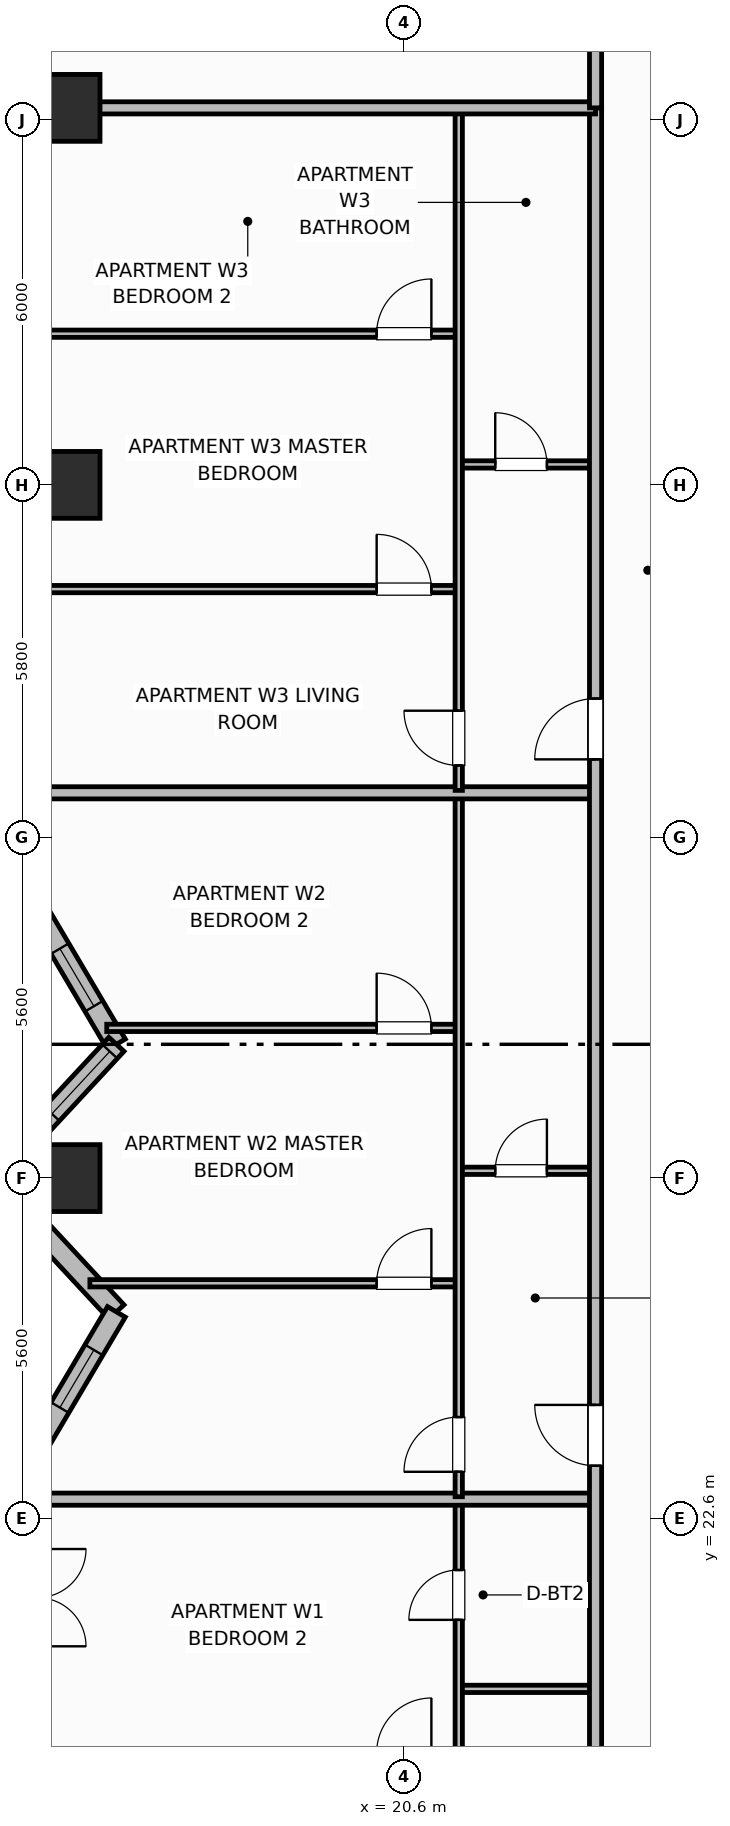
"""IFC4 building model, lengths in metres.
Left out: names, types, materials, properties, quantities, classifications, styles, units other than length and angle.
Written with IfcOpenShell. Run it as: python <this file> out.ifc"""

import sys

from ifc_helpers import new_model, si_unit, direction, frame, frame_2d, origin, origin_2d, place, context, subcontext, project, spatial, rectangle, extrude, element, fill, save


model = new_model("IFC4")
c1 = context("Model", 3, precision=1e-05, world=origin(), true_north=direction((0.0, 1.0)))
c2 = subcontext(c1, "Body", "Model", "MODEL_VIEW")
j1 = project(units=[si_unit("LENGTHUNIT", "METRE"), si_unit("PLANEANGLEUNIT", "RADIAN")], contexts=[c1])
p1 = place(None, origin())
s1 = spatial("IfcSite", under=j1, at=p1, CompositionType="ELEMENT")
p2 = place(p1, origin())
s2 = spatial("IfcBuilding", under=s1, at=p2, CompositionType="ELEMENT")
p3 = place(p2, frame((0.0, 0.0, 114.2)))
s3 = spatial("IfcBuildingStorey", under=s2, at=p3, CompositionType="ELEMENT", Elevation=114.2)
for number, where, z_axis, x_axis in (
    (1, (15.05, 28.2, 0.0), (0.0, 0.0, 1.0), (1.0, 0.0, 0.0)),
    (2, (15.05, 39.6, 0.0), (0.0, 0.0, 1.0), (1.0, 0.0, 0.0)),
    (3, (15.05, 45.8, 0.0), (0.0, 0.0, 1.0), (1.0, 0.0, 0.0)),
):
    element("IfcColumn", number, at=place(p3, frame(where, z_axis=z_axis, x_axis=x_axis)), inside=s3, PredefinedType="COLUMN", context=c2, shape_type="SweptSolid", body=[
        extrude(rectangle(XDim=1.1, YDim=1.1, at=origin_2d()), origin(), (0.0, 0.0, 1.0), 3.7),
    ])
p4 = place(p3, frame((14.57, 32.6, 0.0), z_axis=(0.0, 0.0, 1.0), x_axis=(0.508710000703, -0.860937939218, 0.0)))
e4 = element("IfcWall", 4, at=p4, inside=s3, PredefinedType="SOLIDWALL", context=c2, shape_type="SweptSolid", body=[
    extrude(rectangle(XDim=2.556, YDim=0.34, at=frame_2d((1.278, 0.0))), origin(), (0.0, 0.0, 1.0), 2.7),
])
p5 = place(p4, frame((0.728, 0.0, 0.89)))
e5 = element("IfcOpeningElement", 5, at=p5, cuts=e4, PredefinedType="OPENING", context=c2, shape_type="SweptSolid", body=[
    extrude(rectangle(XDim=1.1, YDim=1.65, at=frame_2d((0.55, 0.825))), frame((0.0, 0.18, 0.0), z_axis=(0.0, -1.0, 0.0), x_axis=(1.0, 0.0, 0.0)), (0.0, 0.0, 1.0), 0.36),
])
p6 = place(p3, frame((15.87, 30.4, 0.0), z_axis=(0.0, 0.0, 1.0), x_axis=(-0.68049031116, -0.732757078722, 0.0)))
e6 = element("IfcWall", 6, at=p6, inside=s3, PredefinedType="SOLIDWALL", context=c2, shape_type="SweptSolid", body=[
    extrude(rectangle(XDim=1.91, YDim=0.34, at=frame_2d((0.955, 0.0))), origin(), (0.0, 0.0, 1.0), 2.7),
])
p7 = place(p6, frame((0.16, 0.0, 0.69)))
e7 = element("IfcOpeningElement", 7, at=p7, cuts=e6, PredefinedType="OPENING", context=c2, shape_type="SweptSolid", body=[
    extrude(rectangle(XDim=1.4, YDim=1.85, at=frame_2d((0.7, 0.925))), frame((0.0, 0.18, 0.0), z_axis=(0.0, -1.0, 0.0), x_axis=(1.0, 0.0, 0.0)), (0.0, 0.0, 1.0), 0.36),
])
p8 = place(p3, frame((14.57, 27.4, 0.0), z_axis=(0.0, 0.0, 1.0), x_axis=(0.68049031116, -0.732757078722, 0.0)))
e8 = element("IfcWall", 8, at=p8, inside=s3, PredefinedType="SOLIDWALL", context=c2, shape_type="SweptSolid", body=[
    extrude(rectangle(XDim=1.91, YDim=0.34, at=frame_2d((0.955, 0.0))), origin(), (0.0, 0.0, 1.0), 2.7),
])
p9 = place(p3, frame((15.87, 26.0, 0.0), z_axis=(0.0, 0.0, 1.0), x_axis=(-0.508751843651, -0.860913213734, 0.0)))
e9 = element("IfcWall", 9, at=p9, inside=s3, PredefinedType="SOLIDWALL", context=c2, shape_type="SweptSolid", body=[
    extrude(rectangle(XDim=2.555, YDim=0.34, at=frame_2d((1.278, 0.0))), origin(), (0.0, 0.0, 1.0), 2.7),
])
p10 = place(p9, frame((0.728, 0.0, 0.89)))
e10 = element("IfcOpeningElement", 10, at=p10, cuts=e9, PredefinedType="OPENING", context=c2, shape_type="SweptSolid", body=[
    extrude(rectangle(XDim=1.1, YDim=1.65, at=frame_2d((0.55, 0.825))), frame((0.0, 0.18, 0.0), z_axis=(0.0, -1.0, 0.0), x_axis=(1.0, 0.0, 0.0)), (0.0, 0.0, 1.0), 0.36),
])
p11 = place(p3, frame((21.5, 19.8, 0.0), z_axis=(0.0, 0.0, 1.0), x_axis=(1.0, 0.0, 0.0)))
e11 = element("IfcWall", 11, at=p11, inside=s3, PredefinedType="PARTITIONING", context=c2, shape_type="SweptSolid", body=[
    extrude(rectangle(XDim=2.25, YDim=0.12, at=frame_2d((1.125, 0.0))), origin(), (0.0, 0.0, 1.0), 2.53),
])
p12 = place(p3, frame((21.5, 10.64, 0.0), z_axis=(0.0, 0.0, 1.0), x_axis=(0.0, 1.0, 0.0)))
e12 = element("IfcWall", 12, at=p12, inside=s3, PredefinedType="PARTITIONING", context=c2, shape_type="SweptSolid", body=[
    extrude(rectangle(XDim=12.24, YDim=0.12, at=frame_2d((6.12, 0.0))), origin(), (0.0, 0.0, 1.0), 2.53),
])
p13 = place(p12, frame((0.41, 0.0, 0.0)))
e13 = element("IfcOpeningElement", 13, at=p13, cuts=e12, PredefinedType="OPENING", context=c2, shape_type="SweptSolid", body=[
    extrude(rectangle(XDim=0.9, YDim=2.1, at=frame_2d((0.45, 1.05))), frame((0.0, 0.07, 0.0), z_axis=(0.0, -1.0, 0.0), x_axis=(1.0, 0.0, 0.0)), (0.0, 0.0, 1.0), 0.14),
])
p14 = place(p12, frame((10.295, 0.0, 0.0)))
e14 = element("IfcOpeningElement", 14, at=p14, cuts=e12, PredefinedType="OPENING", context=c2, shape_type="SweptSolid", body=[
    extrude(rectangle(XDim=0.82, YDim=2.08, at=frame_2d((0.41, 1.04))), frame((0.0, 0.07, 0.0), z_axis=(0.0, -1.0, 0.0), x_axis=(1.0, 0.0, 0.0)), (0.0, 0.0, 1.0), 0.14),
])
p15 = place(p3, frame((14.57, 22.92, 0.0), z_axis=(0.0, 0.0, 1.0), x_axis=(1.0, 0.0, 0.0)))
e15 = element("IfcWall", 15, at=p15, inside=s3, PredefinedType="PARTITIONING", context=c2, shape_type="SweptSolid", body=[
    extrude(rectangle(XDim=9.18, YDim=0.2, at=frame_2d((4.59, 0.0))), origin(), (0.0, 0.0, 1.0), 2.53),
])
p16 = place(p3, frame((21.5, 28.32, 0.0), z_axis=(0.0, 0.0, 1.0), x_axis=(1.0, 0.0, 0.0)))
e16 = element("IfcWall", 16, at=p16, inside=s3, PredefinedType="PARTITIONING", context=c2, shape_type="SweptSolid", body=[
    extrude(rectangle(XDim=2.25, YDim=0.12, at=frame_2d((1.125, 0.0))), origin(), (0.0, 0.0, 1.0), 2.53),
])
p17 = place(p16, frame((0.6, 0.0, 0.0)))
e17 = element("IfcOpeningElement", 17, at=p17, cuts=e16, PredefinedType="OPENING", context=c2, shape_type="SweptSolid", body=[
    extrude(rectangle(XDim=0.85, YDim=2.1, at=frame_2d((0.425, 1.05))), frame((0.0, 0.07, 0.0), z_axis=(0.0, -1.0, 0.0), x_axis=(1.0, 0.0, 0.0)), (0.0, 0.0, 1.0), 0.14),
])
p18 = place(p3, frame((15.434, 26.47, 0.0), z_axis=(0.0, 0.0, 1.0), x_axis=(1.0, 0.0, 0.0)))
e18 = element("IfcWall", 18, at=p18, inside=s3, PredefinedType="PARTITIONING", context=c2, shape_type="SweptSolid", body=[
    extrude(rectangle(XDim=6.066, YDim=0.12, at=frame_2d((3.033, 0.0))), origin(), (0.0, 0.0, 1.0), 2.53),
])
p19 = place(p18, frame((4.716, 0.0, 0.0)))
e19 = element("IfcOpeningElement", 19, at=p19, cuts=e18, PredefinedType="OPENING", context=c2, shape_type="SweptSolid", body=[
    extrude(rectangle(XDim=0.9, YDim=2.1, at=frame_2d((0.45, 1.05))), frame((0.0, 0.07, 0.0), z_axis=(0.0, -1.0, 0.0), x_axis=(1.0, 0.0, 0.0)), (0.0, 0.0, 1.0), 0.14),
])
p20 = place(p3, frame((15.71, 30.67, 0.0), z_axis=(0.0, 0.0, 1.0), x_axis=(1.0, 0.0, 0.0)))
e20 = element("IfcWall", 20, at=p20, inside=s3, PredefinedType="PARTITIONING", context=c2, shape_type="SweptSolid", body=[
    extrude(rectangle(XDim=5.79, YDim=0.12, at=frame_2d((2.895, 0.0))), origin(), (0.0, 0.0, 1.0), 2.53),
])
p21 = place(p20, frame((4.439, 0.0, 0.0)))
e21 = element("IfcOpeningElement", 21, at=p21, cuts=e20, PredefinedType="OPENING", context=c2, shape_type="SweptSolid", body=[
    extrude(rectangle(XDim=0.9, YDim=2.1, at=frame_2d((0.45, 1.05))), frame((0.0, 0.07, 0.0), z_axis=(0.0, -1.0, 0.0), x_axis=(1.0, 0.0, 0.0)), (0.0, 0.0, 1.0), 0.14),
])
p22 = place(p3, frame((21.5, 22.96, 0.0), z_axis=(0.0, 0.0, 1.0), x_axis=(0.0, 1.0, 0.0)))
e22 = element("IfcWall", 22, at=p22, inside=s3, PredefinedType="PARTITIONING", context=c2, shape_type="SweptSolid", body=[
    extrude(rectangle(XDim=11.536, YDim=0.12, at=frame_2d((5.768, 0.0))), origin(), (0.0, 0.0, 1.0), 2.53),
])
p23 = place(p22, frame((0.41, 0.0, 0.0)))
e23 = element("IfcOpeningElement", 23, at=p23, cuts=e22, PredefinedType="OPENING", context=c2, shape_type="SweptSolid", body=[
    extrude(rectangle(XDim=0.9, YDim=2.1, at=frame_2d((0.45, 1.05))), frame((0.0, 0.07, 0.0), z_axis=(0.0, -1.0, 0.0), x_axis=(1.0, 0.0, 0.0)), (0.0, 0.0, 1.0), 0.14),
])
p24 = place(p3, frame((14.57, 34.536, 0.0), z_axis=(0.0, 0.0, 1.0), x_axis=(1.0, 0.0, 0.0)))
e24 = element("IfcWall", 24, at=p24, inside=s3, PredefinedType="PARTITIONING", context=c2, shape_type="SweptSolid", body=[
    extrude(rectangle(XDim=9.18, YDim=0.2, at=frame_2d((4.59, 0.0))), origin(), (0.0, 0.0, 1.0), 2.53),
])
p25 = place(p3, frame((21.5, 39.936, 0.0), z_axis=(0.0, 0.0, 1.0), x_axis=(1.0, 0.0, 0.0)))
e25 = element("IfcWall", 25, at=p25, inside=s3, PredefinedType="PARTITIONING", context=c2, shape_type="SweptSolid", body=[
    extrude(rectangle(XDim=2.25, YDim=0.12, at=frame_2d((1.125, 0.0))), origin(), (0.0, 0.0, 1.0), 2.53),
])
p26 = place(p25, frame((0.6, 0.0, 0.0)))
e26 = element("IfcOpeningElement", 26, at=p26, cuts=e25, PredefinedType="OPENING", context=c2, shape_type="SweptSolid", body=[
    extrude(rectangle(XDim=0.85, YDim=2.1, at=frame_2d((0.425, 1.05))), frame((0.0, 0.07, 0.0), z_axis=(0.0, -1.0, 0.0), x_axis=(1.0, 0.0, 0.0)), (0.0, 0.0, 1.0), 0.14),
])
p27 = place(p3, frame((14.57, 37.886, 0.0), z_axis=(0.0, 0.0, 1.0), x_axis=(1.0, 0.0, 0.0)))
e27 = element("IfcWall", 27, at=p27, inside=s3, PredefinedType="PARTITIONING", context=c2, shape_type="SweptSolid", body=[
    extrude(rectangle(XDim=6.93, YDim=0.12, at=frame_2d((3.465, 0.0))), origin(), (0.0, 0.0, 1.0), 2.53),
])
p28 = place(p27, frame((5.58, 0.0, 0.0)))
e28 = element("IfcOpeningElement", 28, at=p28, cuts=e27, PredefinedType="OPENING", context=c2, shape_type="SweptSolid", body=[
    extrude(rectangle(XDim=0.9, YDim=2.1, at=frame_2d((0.45, 1.05))), frame((0.0, 0.07, 0.0), z_axis=(0.0, -1.0, 0.0), x_axis=(1.0, 0.0, 0.0)), (0.0, 0.0, 1.0), 0.14),
])
p29 = place(p3, frame((14.57, 42.086, 0.0), z_axis=(0.0, 0.0, 1.0), x_axis=(1.0, 0.0, 0.0)))
e29 = element("IfcWall", 29, at=p29, inside=s3, PredefinedType="PARTITIONING", context=c2, shape_type="SweptSolid", body=[
    extrude(rectangle(XDim=6.93, YDim=0.12, at=frame_2d((3.465, 0.0))), origin(), (0.0, 0.0, 1.0), 2.53),
])
p30 = place(p29, frame((5.58, 0.0, 0.0)))
e30 = element("IfcOpeningElement", 30, at=p30, cuts=e29, PredefinedType="OPENING", context=c2, shape_type="SweptSolid", body=[
    extrude(rectangle(XDim=0.9, YDim=2.1, at=frame_2d((0.45, 1.05))), frame((0.0, 0.07, 0.0), z_axis=(0.0, -1.0, 0.0), x_axis=(1.0, 0.0, 0.0)), (0.0, 0.0, 1.0), 0.14),
])
p31 = place(p3, frame((21.5, 34.576, 0.0), z_axis=(0.0, 0.0, 1.0), x_axis=(0.0, 1.0, 0.0)))
e31 = element("IfcWall", 31, at=p31, inside=s3, PredefinedType="PARTITIONING", context=c2, shape_type="SweptSolid", body=[
    extrude(rectangle(XDim=11.184, YDim=0.12, at=frame_2d((5.592, 0.0))), origin(), (0.0, 0.0, 1.0), 2.53),
])
p32 = place(p31, frame((0.41, 0.0, 0.0)))
e32 = element("IfcOpeningElement", 32, at=p32, cuts=e31, PredefinedType="OPENING", context=c2, shape_type="SweptSolid", body=[
    extrude(rectangle(XDim=0.9, YDim=2.1, at=frame_2d((0.45, 1.05))), frame((0.0, 0.07, 0.0), z_axis=(0.0, -1.0, 0.0), x_axis=(1.0, 0.0, 0.0)), (0.0, 0.0, 1.0), 0.14),
])
p33 = place(p3, frame((23.75, 10.6, 0.0), z_axis=(0.0, 0.0, 1.0), x_axis=(0.0, 1.0, 0.0)))
e33 = element("IfcWall", 33, at=p33, inside=s3, PredefinedType="PARTITIONING", context=c2, shape_type="SweptSolid", body=[
    extrude(rectangle(XDim=35.2, YDim=0.2, at=frame_2d((17.6, 0.0))), origin(), (0.0, 0.0, 1.0), 2.53),
])
p34 = place(p33, frame((2.65, 0.0, 0.0)))
e34 = element("IfcOpeningElement", 34, at=p34, cuts=e33, PredefinedType="OPENING", context=c2, shape_type="SweptSolid", body=[
    extrude(rectangle(XDim=1.0, YDim=2.15, at=frame_2d((0.5, 1.075))), frame((0.0, 0.11, 0.0), z_axis=(0.0, -1.0, 0.0), x_axis=(1.0, 0.0, 0.0)), (0.0, 0.0, 1.0), 0.22),
])
p35 = place(p33, frame((12.87, 0.0, 0.0)))
e35 = element("IfcOpeningElement", 35, at=p35, cuts=e33, PredefinedType="OPENING", context=c2, shape_type="SweptSolid", body=[
    extrude(rectangle(XDim=1.0, YDim=2.15, at=frame_2d((0.5, 1.075))), frame((0.0, 0.11, 0.0), z_axis=(0.0, -1.0, 0.0), x_axis=(1.0, 0.0, 0.0)), (0.0, 0.0, 1.0), 0.22),
])
p36 = place(p33, frame((24.486, 0.0, 0.0)))
e36 = element("IfcOpeningElement", 36, at=p36, cuts=e33, PredefinedType="OPENING", context=c2, shape_type="SweptSolid", body=[
    extrude(rectangle(XDim=1.0, YDim=2.15, at=frame_2d((0.5, 1.075))), frame((0.0, 0.11, 0.0), z_axis=(0.0, -1.0, 0.0), x_axis=(1.0, 0.0, 0.0)), (0.0, 0.0, 1.0), 0.22),
])
p37 = place(p3, frame((14.99, 45.8, 0.0), z_axis=(0.0, 0.0, 1.0), x_axis=(1.0, 0.0, 0.0)))
e37 = element("IfcWall", 37, at=p37, inside=s3, PredefinedType="PARTITIONING", context=c2, shape_type="SweptSolid", body=[
    extrude(rectangle(XDim=8.76, YDim=0.2, at=frame_2d((4.38, 0.0))), origin(), (0.0, 0.0, 1.0), 2.53),
])
p38 = place(p3, frame((23.75, 45.8, 0.0), z_axis=(0.0, 0.0, 1.0), x_axis=(0.0, 1.0, 0.0)))
e38 = element("IfcWall", 38, at=p38, inside=s3, PredefinedType="PARTITIONING", context=c2, shape_type="SweptSolid", body=[
    extrude(rectangle(XDim=5.63, YDim=0.2, at=frame_2d((2.815, 0.0))), origin(), (0.0, 0.0, 1.0), 2.53),
])
p39 = place(p5, origin())
e39 = element("IfcWindow", 39, at=p39, inside=s3, PartitioningType="SINGLE_PANEL", PredefinedType="WINDOW", context=c2, shape_type="SweptSolid", body=[
    extrude(rectangle(XDim=1.1, YDim=1.65, at=frame_2d((0.55, 0.825))), frame((0.0, 0.03, 0.0), z_axis=(0.0, -1.0, 0.0), x_axis=(1.0, 0.0, 0.0)), (0.0, 0.0, 1.0), 0.06),
])
fill(e5, e39)
p40 = place(p7, origin())
e40 = element("IfcWindow", 40, at=p40, inside=s3, PartitioningType="SINGLE_PANEL", PredefinedType="WINDOW", context=c2, shape_type="SweptSolid", body=[
    extrude(rectangle(XDim=1.4, YDim=1.85, at=frame_2d((0.7, 0.925))), frame((0.0, 0.03, 0.0), z_axis=(0.0, -1.0, 0.0), x_axis=(1.0, 0.0, 0.0)), (0.0, 0.0, 1.0), 0.06),
])
fill(e7, e40)
p41 = place(p10, origin())
e41 = element("IfcWindow", 41, at=p41, inside=s3, PartitioningType="SINGLE_PANEL", PredefinedType="WINDOW", context=c2, shape_type="SweptSolid", body=[
    extrude(rectangle(XDim=1.1, YDim=1.65, at=frame_2d((0.55, 0.825))), frame((0.0, 0.03, 0.0), z_axis=(0.0, -1.0, 0.0), x_axis=(1.0, 0.0, 0.0)), (0.0, 0.0, 1.0), 0.06),
])
fill(e10, e41)
p42 = place(p14, origin())
e42 = element("IfcDoor", 42, at=p42, inside=s3, OperationType="SINGLE_SWING_LEFT", PredefinedType="DOOR", context=c2, shape_type="SweptSolid", body=[
    extrude(rectangle(XDim=0.82, YDim=2.08, at=frame_2d((0.41, 1.04))), frame((0.0, 0.025, 0.0), z_axis=(0.0, -1.0, 0.0), x_axis=(1.0, 0.0, 0.0)), (0.0, 0.0, 1.0), 0.05),
])
fill(e14, e42)
p43 = place(p17, origin())
e43 = element("IfcDoor", 43, at=p43, inside=s3, OperationType="SINGLE_SWING_RIGHT", PredefinedType="DOOR", context=c2, shape_type="SweptSolid", body=[
    extrude(rectangle(XDim=0.85, YDim=2.1, at=frame_2d((0.425, 1.05))), frame((0.0, 0.025, 0.0), z_axis=(0.0, -1.0, 0.0), x_axis=(1.0, 0.0, 0.0)), (0.0, 0.0, 1.0), 0.05),
])
fill(e17, e43)
p44 = place(p19, origin())
e44 = element("IfcDoor", 44, at=p44, inside=s3, OperationType="SINGLE_SWING_RIGHT", PredefinedType="DOOR", context=c2, shape_type="SweptSolid", body=[
    extrude(rectangle(XDim=0.9, YDim=2.1, at=frame_2d((0.45, 1.05))), frame((0.0, 0.025, 0.0), z_axis=(0.0, -1.0, 0.0), x_axis=(1.0, 0.0, 0.0)), (0.0, 0.0, 1.0), 0.05),
])
fill(e19, e44)
p45 = place(p21, origin())
e45 = element("IfcDoor", 45, at=p45, inside=s3, OperationType="SINGLE_SWING_LEFT", PredefinedType="DOOR", context=c2, shape_type="SweptSolid", body=[
    extrude(rectangle(XDim=0.9, YDim=2.1, at=frame_2d((0.45, 1.05))), frame((0.0, 0.025, 0.0), z_axis=(0.0, -1.0, 0.0), x_axis=(1.0, 0.0, 0.0)), (0.0, 0.0, 1.0), 0.05),
])
fill(e21, e45)
p46 = place(p23, origin())
e46 = element("IfcDoor", 46, at=p46, inside=s3, OperationType="SINGLE_SWING_LEFT", PredefinedType="DOOR", context=c2, shape_type="SweptSolid", body=[
    extrude(rectangle(XDim=0.9, YDim=2.1, at=frame_2d((0.45, 1.05))), frame((0.0, 0.025, 0.0), z_axis=(0.0, -1.0, 0.0), x_axis=(1.0, 0.0, 0.0)), (0.0, 0.0, 1.0), 0.05),
])
fill(e23, e46)
p47 = place(p26, origin())
e47 = element("IfcDoor", 47, at=p47, inside=s3, OperationType="SINGLE_SWING_LEFT", PredefinedType="DOOR", context=c2, shape_type="SweptSolid", body=[
    extrude(rectangle(XDim=0.85, YDim=2.1, at=frame_2d((0.425, 1.05))), frame((0.0, 0.025, 0.0), z_axis=(0.0, -1.0, 0.0), x_axis=(1.0, 0.0, 0.0)), (0.0, 0.0, 1.0), 0.05),
])
fill(e26, e47)
p48 = place(p28, origin())
e48 = element("IfcDoor", 48, at=p48, inside=s3, OperationType="SINGLE_SWING_LEFT", PredefinedType="DOOR", context=c2, shape_type="SweptSolid", body=[
    extrude(rectangle(XDim=0.9, YDim=2.1, at=frame_2d((0.45, 1.05))), frame((0.0, 0.025, 0.0), z_axis=(0.0, -1.0, 0.0), x_axis=(1.0, 0.0, 0.0)), (0.0, 0.0, 1.0), 0.05),
])
fill(e28, e48)
p49 = place(p30, origin())
e49 = element("IfcDoor", 49, at=p49, inside=s3, OperationType="SINGLE_SWING_RIGHT", PredefinedType="DOOR", context=c2, shape_type="SweptSolid", body=[
    extrude(rectangle(XDim=0.9, YDim=2.1, at=frame_2d((0.45, 1.05))), frame((0.0, 0.025, 0.0), z_axis=(0.0, -1.0, 0.0), x_axis=(1.0, 0.0, 0.0)), (0.0, 0.0, 1.0), 0.05),
])
fill(e30, e49)
p50 = place(p32, origin())
e50 = element("IfcDoor", 50, at=p50, inside=s3, OperationType="SINGLE_SWING_RIGHT", PredefinedType="DOOR", context=c2, shape_type="SweptSolid", body=[
    extrude(rectangle(XDim=0.9, YDim=2.1, at=frame_2d((0.45, 1.05))), frame((0.0, 0.025, 0.0), z_axis=(0.0, -1.0, 0.0), x_axis=(1.0, 0.0, 0.0)), (0.0, 0.0, 1.0), 0.05),
])
fill(e32, e50)
p51 = place(p35, origin())
e51 = element("IfcDoor", 51, at=p51, inside=s3, OperationType="SINGLE_SWING_RIGHT", PredefinedType="DOOR", context=c2, shape_type="SweptSolid", body=[
    extrude(rectangle(XDim=1.0, YDim=2.15, at=frame_2d((0.5, 1.075))), frame((0.0, 0.025, 0.0), z_axis=(0.0, -1.0, 0.0), x_axis=(1.0, 0.0, 0.0)), (0.0, 0.0, 1.0), 0.05),
])
fill(e35, e51)
p52 = place(p36, origin())
e52 = element("IfcDoor", 52, at=p52, inside=s3, OperationType="SINGLE_SWING_LEFT", PredefinedType="DOOR", context=c2, shape_type="SweptSolid", body=[
    extrude(rectangle(XDim=1.0, YDim=2.15, at=frame_2d((0.5, 1.075))), frame((0.0, 0.025, 0.0), z_axis=(0.0, -1.0, 0.0), x_axis=(1.0, 0.0, 0.0)), (0.0, 0.0, 1.0), 0.05),
])
fill(e36, e52)
save(model, sys.argv[1])
